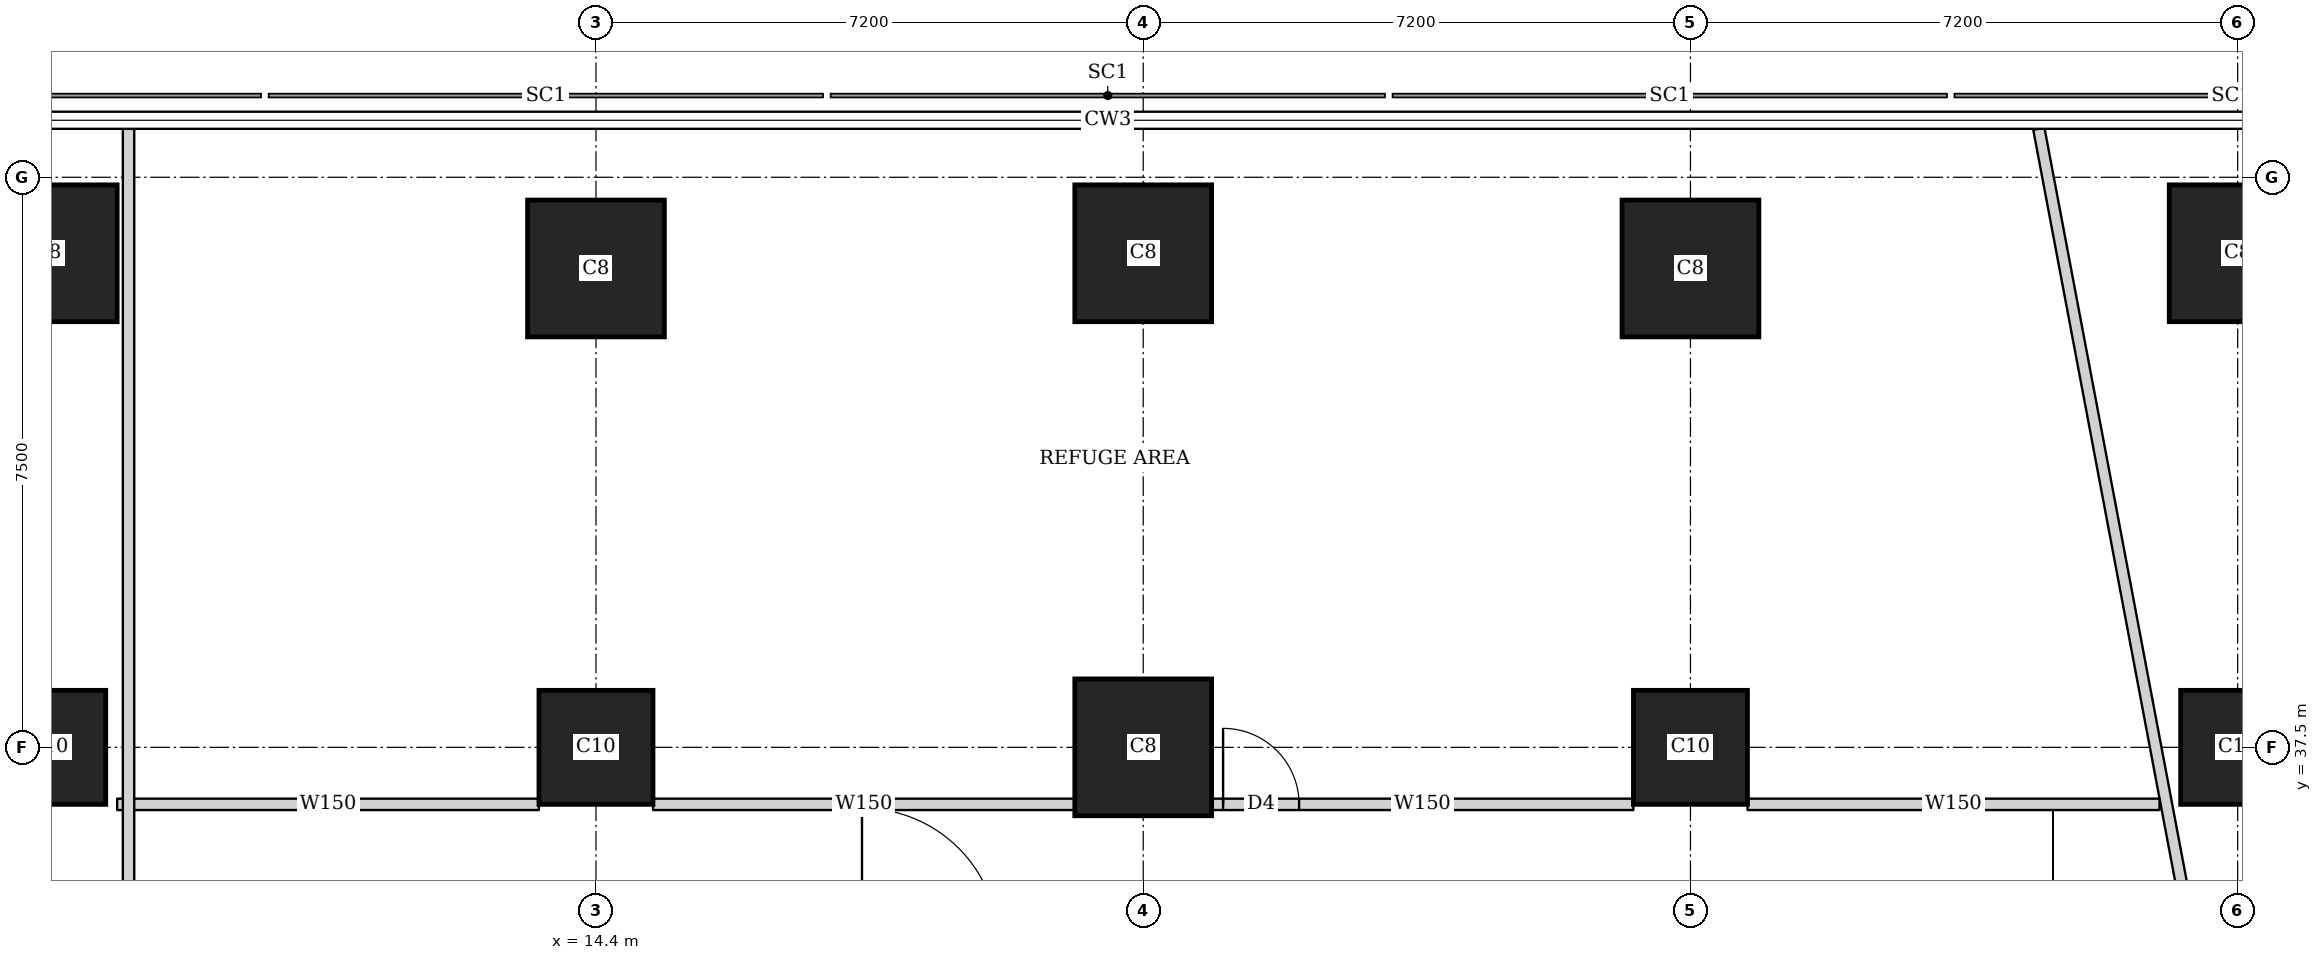
"""IFC4 building model, lengths in metres.
Left out: names, types, materials, properties, quantities, classifications, styles, units other than length and angle.
Written with IfcOpenShell. Run it as: python <this file> out.ifc"""

import sys

from ifc_helpers import new_model, si_unit, direction, frame, frame_2d, origin, origin_2d, place, context, subcontext, project, spatial, rectangle, extrude, element, fill, save


model = new_model("IFC4")
c1 = context("Model", 3, precision=1e-05, world=origin(), true_north=direction((0.0, 1.0)))
c2 = subcontext(c1, "Body", "Model", "MODEL_VIEW")
j1 = project(units=[si_unit("LENGTHUNIT", "METRE"), si_unit("PLANEANGLEUNIT", "RADIAN")], contexts=[c1])
p1 = place(None, origin())
s1 = spatial("IfcSite", under=j1, at=p1, CompositionType="ELEMENT")
p2 = place(p1, origin())
s2 = spatial("IfcBuilding", under=s1, at=p2, CompositionType="ELEMENT")
p3 = place(p2, frame((0.0, 0.0, 188.3)))
s3 = spatial("IfcBuildingStorey", under=s2, at=p3, CompositionType="ELEMENT", Elevation=188.3)
for number, where, z_axis, x_axis in (
    (1, (7.2, 37.5, 0.0), (0.0, 0.0, 1.0), (1.0, 0.0, 0.0)),
    (2, (14.4, 37.5, 0.0), (0.0, 0.0, 1.0), (1.0, 0.0, 0.0)),
):
    element("IfcColumn", number, at=place(p3, frame(where, z_axis=z_axis, x_axis=x_axis)), inside=s3, PredefinedType="COLUMN", context=c2, shape_type="SweptSolid", body=[
        extrude(rectangle(XDim=1.5, YDim=1.5, at=origin_2d()), origin(), (0.0, 0.0, 1.0), 5.4),
    ])
p4 = place(p3, frame((21.6, 37.5, 0.0), z_axis=(0.0, 0.0, 1.0), x_axis=(1.0, 0.0, 0.0)))
e3 = element("IfcColumn", 3, at=p4, inside=s3, PredefinedType="COLUMN", context=c2, shape_type="SweptSolid", body=[
    extrude(rectangle(XDim=1.8, YDim=1.8, at=origin_2d()), origin(), (0.0, 0.0, 1.0), 5.4),
])
for number, where, z_axis, x_axis in (
    (4, (28.8, 37.5, 0.0), (0.0, 0.0, 1.0), (1.0, 0.0, 0.0)),
    (5, (36.0, 37.5, 0.0), (0.0, 0.0, 1.0), (1.0, 0.0, 0.0)),
):
    element("IfcColumn", number, at=place(p3, frame(where, z_axis=z_axis, x_axis=x_axis)), inside=s3, PredefinedType="COLUMN", context=c2, shape_type="SweptSolid", body=[
        extrude(rectangle(XDim=1.5, YDim=1.5, at=origin_2d()), origin(), (0.0, 0.0, 1.0), 5.4),
    ])
for number, where, z_axis, x_axis in (
    (6, (7.2, 44.0, 0.0), (0.0, 0.0, 1.0), (1.0, 0.0, 0.0)),
    (7, (14.4, 43.8, 0.0), (0.0, 0.0, 1.0), (1.0, 0.0, 0.0)),
    (8, (21.6, 44.0, 0.0), (0.0, 0.0, 1.0), (1.0, 0.0, 0.0)),
    (9, (28.8, 43.8, 0.0), (0.0, 0.0, 1.0), (1.0, 0.0, 0.0)),
    (10, (36.0, 44.0, 0.0), (0.0, 0.0, 1.0), (1.0, 0.0, 0.0)),
):
    element("IfcColumn", number, at=place(p3, frame(where, z_axis=z_axis, x_axis=x_axis)), inside=s3, PredefinedType="COLUMN", context=c2, shape_type="SweptSolid", body=[
        extrude(rectangle(XDim=1.8, YDim=1.8, at=origin_2d()), origin(), (0.0, 0.0, 1.0), 5.4),
    ])
p5 = place(p3, frame((8.25, -0.637, 0.0), z_axis=(0.0, 0.0, 1.0), x_axis=(0.0, 1.0, 0.0)))
e11 = element("IfcWall", 11, at=p5, inside=s3, PredefinedType="SOLIDWALL", context=c2, shape_type="SweptSolid", body=[
    extrude(rectangle(XDim=46.275, YDim=0.15, at=frame_2d((23.137, 0.0))), origin(), (0.0, 0.0, 1.0), 3.35),
])
p6 = place(p5, frame((10.462, 0.0, 0.0)))
e12 = element("IfcOpeningElement", 12, at=p6, cuts=e11, PredefinedType="OPENING", context=c2, shape_type="SweptSolid", body=[
    extrude(rectangle(XDim=2.0, YDim=2.1, at=frame_2d((1.0, 1.05))), frame((0.0, 0.085, 0.0), z_axis=(0.0, -1.0, 0.0), x_axis=(1.0, 0.0, 0.0)), (0.0, 0.0, 1.0), 0.17),
])
p7 = place(p5, frame((34.312, 0.0, 0.0)))
e13 = element("IfcOpeningElement", 13, at=p7, cuts=e11, PredefinedType="OPENING", context=c2, shape_type="SweptSolid", body=[
    extrude(rectangle(XDim=1.0, YDim=2.1, at=frame_2d((0.5, 1.05))), frame((0.0, 0.085, 0.0), z_axis=(0.0, -1.0, 0.0), x_axis=(1.0, 0.0, 0.0)), (0.0, 0.0, 1.0), 0.17),
])
p8 = place(p3, frame((8.1, 36.75, 0.0), z_axis=(0.0, 0.0, 1.0), x_axis=(1.0, 0.0, 0.0)))
e14 = element("IfcWall", 14, at=p8, inside=s3, PredefinedType="SOLIDWALL", context=c2, shape_type="SweptSolid", body=[
    extrude(rectangle(XDim=5.549, YDim=0.15, at=frame_2d((2.774, 0.0))), origin(), (0.0, 0.0, 1.0), 3.55),
])
p9 = place(p3, frame((15.151, 36.75, 0.0), z_axis=(0.0, 0.0, 1.0), x_axis=(1.0, 0.0, 0.0)))
e15 = element("IfcWall", 15, at=p9, inside=s3, PredefinedType="SOLIDWALL", context=c2, shape_type="SweptSolid", body=[
    extrude(rectangle(XDim=5.548, YDim=0.15, at=frame_2d((2.774, 0.0))), origin(), (0.0, 0.0, 1.0), 3.15),
])
p10 = place(p3, frame((22.501, 36.75, 0.0), z_axis=(0.0, 0.0, 1.0), x_axis=(1.0, 0.0, 0.0)))
e16 = element("IfcWall", 16, at=p10, inside=s3, PredefinedType="SOLIDWALL", context=c2, shape_type="SweptSolid", body=[
    extrude(rectangle(XDim=5.548, YDim=0.15, at=frame_2d((2.774, 0.0))), origin(), (0.0, 0.0, 1.0), 3.15),
])
p11 = place(p10, frame((0.15, 0.0, 0.0)))
e17 = element("IfcOpeningElement", 17, at=p11, cuts=e16, PredefinedType="OPENING", context=c2, shape_type="SweptSolid", body=[
    extrude(rectangle(XDim=1.0, YDim=2.1, at=frame_2d((0.5, 1.05))), frame((0.0, 0.085, 0.0), z_axis=(0.0, -1.0, 0.0), x_axis=(1.0, 0.0, 0.0)), (0.0, 0.0, 1.0), 0.17),
])
p12 = place(p3, frame((29.551, 36.75, 0.0), z_axis=(0.0, 0.0, 1.0), x_axis=(1.0, 0.0, 0.0)))
e18 = element("IfcWall", 18, at=p12, inside=s3, PredefinedType="SOLIDWALL", context=c2, shape_type="SweptSolid", body=[
    extrude(rectangle(XDim=5.421, YDim=0.15, at=frame_2d((2.71, 0.0))), origin(), (0.0, 0.0, 1.0), 3.15),
])
p13 = place(p3, frame((33.384, 45.638, 0.0), z_axis=(0.0, 0.0, 1.0), x_axis=(0.185609889355, -0.982623513342, 0.0)))
e19 = element("IfcWall", 19, at=p13, inside=s3, PredefinedType="SOLIDWALL", context=c2, shape_type="SweptSolid", body=[
    extrude(rectangle(XDim=47.093, YDim=0.15, at=frame_2d((23.547, 0.0))), origin(), (0.0, 0.0, 1.0), 3.35),
])
p14 = place(p13, frame((11.166, 0.0, 0.0)))
e20 = element("IfcOpeningElement", 20, at=p14, cuts=e19, PredefinedType="OPENING", context=c2, shape_type="SweptSolid", body=[
    extrude(rectangle(XDim=1.0, YDim=2.1, at=frame_2d((0.5, 1.05))), frame((0.0, 0.085, 0.0), z_axis=(0.0, -1.0, 0.0), x_axis=(1.0, 0.0, 0.0)), (0.0, 0.0, 1.0), 0.17),
])
p15 = place(p13, frame((26.737, 0.0, 0.0)))
e21 = element("IfcOpeningElement", 21, at=p15, cuts=e19, PredefinedType="OPENING", context=c2, shape_type="SweptSolid", body=[
    extrude(rectangle(XDim=2.0, YDim=2.1, at=frame_2d((1.0, 1.05))), frame((0.0, 0.085, 0.0), z_axis=(0.0, -1.0, 0.0), x_axis=(1.0, 0.0, 0.0)), (0.0, 0.0, 1.0), 0.17),
])
p16 = place(p13, frame((34.058, 0.0, 0.0)))
e22 = element("IfcOpeningElement", 22, at=p16, cuts=e19, PredefinedType="OPENING", context=c2, shape_type="SweptSolid", body=[
    extrude(rectangle(XDim=2.0, YDim=2.1, at=frame_2d((1.0, 1.05))), frame((0.0, 0.085, 0.0), z_axis=(0.0, -1.0, 0.0), x_axis=(1.0, 0.0, 0.0)), (0.0, 0.0, 1.0), 0.17),
])
p17 = place(p11, origin())
e23 = element("IfcDoor", 23, at=p17, inside=s3, OperationType="SINGLE_SWING_LEFT", PredefinedType="DOOR", context=c2, shape_type="SweptSolid", body=[
    extrude(rectangle(XDim=1.0, YDim=2.1, at=frame_2d((0.5, 1.05))), frame((0.0, 0.025, 0.0), z_axis=(0.0, -1.0, 0.0), x_axis=(1.0, 0.0, 0.0)), (0.0, 0.0, 1.0), 0.05),
])
fill(e17, e23)
save(model, sys.argv[1])
